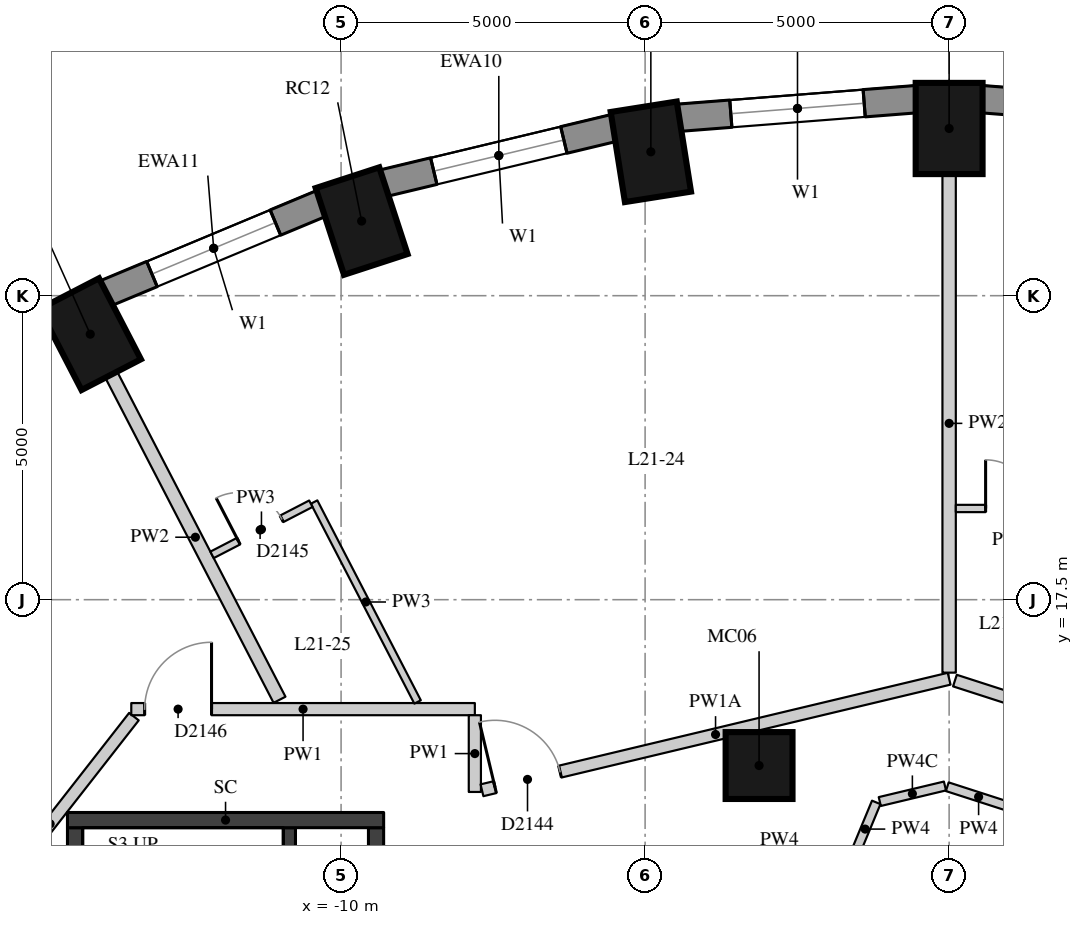
"""IFC4 building model, lengths in metres.
Left out: names, types, materials, properties, quantities, classifications, styles, units other than length and angle.
Written with IfcOpenShell. Run it as: python <this file> out.ifc"""

import sys

from ifc_helpers import new_model, si_unit, direction, frame, frame_2d, origin, origin_2d, place, context, subcontext, project, spatial, rectangle, extrude, element, fill, save


model = new_model("IFC4")
c1 = context("Model", 3, precision=1e-05, world=origin(), true_north=direction((0.0, 1.0)))
c2 = subcontext(c1, "Body", "Model", "MODEL_VIEW")
j1 = project(units=[si_unit("LENGTHUNIT", "METRE"), si_unit("PLANEANGLEUNIT", "RADIAN")], contexts=[c1])
p1 = place(None, origin())
s1 = spatial("IfcSite", under=j1, at=p1, CompositionType="ELEMENT")
p2 = place(p1, origin())
s2 = spatial("IfcBuilding", under=s1, at=p2, CompositionType="ELEMENT")
p3 = place(p2, frame((0.0, 0.0, 77.8)))
s3 = spatial("IfcBuildingStorey", under=s2, at=p3, CompositionType="ELEMENT", Elevation=77.8)
for number, where, z_axis, x_axis in (
    (1, (0.0, 25.25, 0.0), (0.0, 0.0, 1.0), (0.0, 1.0, 0.0)),
    (2, (-4.906, 24.866, 0.0), (0.0, 0.0, 1.0), (-0.156, 0.988, 0.0)),
    (3, (-9.662, 23.727, 0.0), (0.0, 0.0, 1.0), (-0.31, 0.951, 0.0)),
    (4, (-14.125, 21.867, 0.0), (0.0, 0.0, 1.0), (-0.46, 0.888, 0.0)),
):
    element("IfcColumn", number, at=place(p3, frame(where, z_axis=z_axis, x_axis=x_axis)), inside=s3, PredefinedType="COLUMN", context=c2, shape_type="SweptSolid", body=[
        extrude(rectangle(XDim=1.5, YDim=1.1, at=origin_2d()), origin(), (0.0, 0.0, 1.0), 3.3),
    ])
p4 = place(p3, frame((-3.126, 14.772, 0.0), z_axis=(0.0, 0.0, 1.0), x_axis=(1.0, 0.0, 0.0)))
e5 = element("IfcColumn", 5, at=p4, inside=s3, PredefinedType="COLUMN", context=c2, shape_type="SweptSolid", body=[
    extrude(rectangle(XDim=1.1, YDim=1.1, at=origin_2d()), origin(), (0.0, 0.0, 1.0), 3.3),
])
p5 = place(p3, frame((4.457, 25.426, 0.0), z_axis=(0.0, 0.0, 1.0), x_axis=(-0.996955972145, 0.077966592873, 0.0)))
e6 = element("IfcWall", 6, at=p5, inside=s3, PredefinedType="SOLIDWALL", context=c2, shape_type="SweptSolid", body=[
    extrude(rectangle(XDim=3.939, YDim=0.45, at=frame_2d((1.97, 0.0))), origin(), (0.0, 0.0, 1.0), 3.02),
])
p6 = place(p5, frame((0.87, 0.0, 0.4)))
e7 = element("IfcOpeningElement", 7, at=p6, cuts=e6, PredefinedType="OPENING", context=c2, shape_type="SweptSolid", body=[
    extrude(rectangle(XDim=2.2, YDim=1.75, at=frame_2d((1.1, 0.875))), frame((0.0, 0.235, 0.0), z_axis=(0.0, -1.0, 0.0), x_axis=(1.0, 0.0, 0.0)), (0.0, 0.0, 1.0), 0.47),
])
p7 = place(p3, frame((-0.53, 25.733, 0.0), z_axis=(0.0, 0.0, 1.0), x_axis=(-0.996955972145, -0.077966592873, 0.0)))
e8 = element("IfcWall", 8, at=p7, inside=s3, PredefinedType="SOLIDWALL", context=c2, shape_type="SweptSolid", body=[
    extrude(rectangle(XDim=3.939, YDim=0.45, at=frame_2d((1.97, 0.0))), origin(), (0.0, 0.0, 1.0), 3.02),
])
p8 = place(p7, frame((0.87, 0.0, 0.4)))
e9 = element("IfcOpeningElement", 9, at=p8, cuts=e8, PredefinedType="OPENING", context=c2, shape_type="SweptSolid", body=[
    extrude(rectangle(XDim=2.2, YDim=1.75, at=frame_2d((1.1, 0.875))), frame((0.0, 0.235, 0.0), z_axis=(0.0, -1.0, 0.0), x_axis=(1.0, 0.0, 0.0)), (0.0, 0.0, 1.0), 0.47),
])
p9 = place(p3, frame((-5.504, 25.26, 0.0), z_axis=(0.0, 0.0, 1.0), x_axis=(-0.972496561493, -0.232917233979, 0.0)))
e10 = element("IfcWall", 10, at=p9, inside=s3, PredefinedType="SOLIDWALL", context=c2, shape_type="SweptSolid", body=[
    extrude(rectangle(XDim=3.911, YDim=0.45, at=frame_2d((1.956, 0.0))), origin(), (0.0, 0.0, 1.0), 3.02),
])
p10 = place(p9, frame((0.855, 0.0, 0.4)))
e11 = element("IfcOpeningElement", 11, at=p10, cuts=e10, PredefinedType="OPENING", context=c2, shape_type="SweptSolid", body=[
    extrude(rectangle(XDim=2.2, YDim=1.75, at=frame_2d((1.1, 0.875))), frame((0.0, 0.235, 0.0), z_axis=(0.0, -1.0, 0.0), x_axis=(1.0, 0.0, 0.0)), (0.0, 0.0, 1.0), 0.47),
])
p11 = place(p3, frame((-10.315, 24.021, 0.0), z_axis=(0.0, 0.0, 1.0), x_axis=(-0.923031964282, -0.384723267966, 0.0)))
e12 = element("IfcWall", 12, at=p11, inside=s3, PredefinedType="SOLIDWALL", context=c2, shape_type="SweptSolid", body=[
    extrude(rectangle(XDim=3.856, YDim=0.45, at=frame_2d((1.928, 0.0))), origin(), (0.0, 0.0, 1.0), 3.02),
])
p12 = place(p11, frame((0.828, 0.0, 0.4)))
e13 = element("IfcOpeningElement", 13, at=p12, cuts=e12, PredefinedType="OPENING", context=c2, shape_type="SweptSolid", body=[
    extrude(rectangle(XDim=2.2, YDim=1.75, at=frame_2d((1.1, 0.875))), frame((0.0, 0.235, 0.0), z_axis=(0.0, -1.0, 0.0), x_axis=(1.0, 0.0, 0.0)), (0.0, 0.0, 1.0), 0.47),
])
p13 = place(p3, frame((-14.817, 22.051, 0.0), z_axis=(0.0, 0.0, 1.0), x_axis=(-0.847635480093, -0.530579016629, 0.0)))
e14 = element("IfcWall", 14, at=p13, inside=s3, PredefinedType="SOLIDWALL", context=c2, shape_type="SweptSolid", body=[
    extrude(rectangle(XDim=3.782, YDim=0.45, at=frame_2d((1.891, 0.0))), origin(), (0.0, 0.0, 1.0), 3.02),
])
p14 = place(p13, frame((0.791, 0.0, 0.4)))
e15 = element("IfcOpeningElement", 15, at=p14, cuts=e14, PredefinedType="OPENING", context=c2, shape_type="SweptSolid", body=[
    extrude(rectangle(XDim=2.2, YDim=1.75, at=frame_2d((1.1, 0.875))), frame((0.0, 0.235, 0.0), z_axis=(0.0, -1.0, 0.0), x_axis=(1.0, 0.0, 0.0)), (0.0, 0.0, 1.0), 0.47),
])
p15 = place(p3, frame((-10.85, 7.75, 0.0), z_axis=(0.0, 0.0, 1.0), x_axis=(0.0, 1.0, 0.0)))
e16 = element("IfcWall", 16, at=p15, inside=s3, PredefinedType="SHEAR", context=c2, shape_type="SweptSolid", body=[
    extrude(rectangle(XDim=6.0, YDim=0.2, at=frame_2d((3.0, 0.0))), origin(), (0.0, 0.0, 1.0), 3.02),
])
p16 = place(p15, frame((0.1, 0.0, 0.0)))
e17 = element("IfcOpeningElement", 17, at=p16, cuts=e16, PredefinedType="OPENING", context=c2, shape_type="SweptSolid", body=[
    extrude(rectangle(XDim=1.5, YDim=2.1, at=frame_2d((0.75, 1.05))), frame((0.0, 0.11, 0.0), z_axis=(0.0, -1.0, 0.0), x_axis=(1.0, 0.0, 0.0)), (0.0, 0.0, 1.0), 0.22),
])
p17 = place(p3, frame((-14.375, 7.75, -0.28), z_axis=(0.0, 0.0, 1.0), x_axis=(0.0, 1.0, 0.0)))
e18 = element("IfcWall", 18, at=p17, inside=s3, PredefinedType="SHEAR", context=c2, shape_type="SweptSolid", body=[
    extrude(rectangle(XDim=6.0, YDim=0.25, at=frame_2d((3.0, 0.0))), origin(), (0.0, 0.0, 1.0), 3.3),
])
p18 = place(p3, frame((-9.425, 7.75, -0.28), z_axis=(0.0, 0.0, 1.0), x_axis=(0.0, 1.0, 0.0)))
e19 = element("IfcWall", 19, at=p18, inside=s3, PredefinedType="SHEAR", context=c2, shape_type="SweptSolid", body=[
    extrude(rectangle(XDim=6.0, YDim=0.25, at=frame_2d((3.0, 0.0))), origin(), (0.0, 0.0, 1.0), 3.3),
])
p19 = place(p18, frame((2.1, 0.0, 0.28)))
e20 = element("IfcOpeningElement", 20, at=p19, cuts=e19, PredefinedType="OPENING", context=c2, shape_type="SweptSolid", body=[
    extrude(rectangle(XDim=1.5, YDim=2.1, at=frame_2d((0.75, 1.05))), frame((0.0, 0.135, 0.0), z_axis=(0.0, -1.0, 0.0), x_axis=(1.0, 0.0, 0.0)), (0.0, 0.0, 1.0), 0.27),
])
p20 = place(p3, frame((-14.5, 13.875, -0.28), z_axis=(0.0, 0.0, 1.0), x_axis=(1.0, 0.0, 0.0)))
e21 = element("IfcWall", 21, at=p20, inside=s3, PredefinedType="SHEAR", context=c2, shape_type="SweptSolid", body=[
    extrude(rectangle(XDim=5.2, YDim=0.25, at=frame_2d((2.6, 0.0))), origin(), (0.0, 0.0, 1.0), 3.3),
])
p21 = place(p3, frame((-16.163, 12.049, 0.0), z_axis=(0.0, 0.0, 1.0), x_axis=(0.6157435057, 0.787946657578, 0.0)))
e22 = element("IfcWall", 22, at=p21, inside=s3, PredefinedType="PARTITIONING", context=c2, shape_type="SweptSolid", body=[
    extrude(rectangle(XDim=4.477, YDim=0.2, at=frame_2d((2.239, 0.0))), origin(), (0.0, 0.0, 1.0), 3.02),
])
p22 = place(p3, frame((-13.45, 15.7, 0.0), z_axis=(0.0, 0.0, 1.0), x_axis=(1.0, 0.0, 0.0)))
e23 = element("IfcWall", 23, at=p22, inside=s3, PredefinedType="PARTITIONING", context=c2, shape_type="SweptSolid", body=[
    extrude(rectangle(XDim=5.65, YDim=0.2, at=frame_2d((2.825, 0.0))), origin(), (0.0, 0.0, 1.0), 3.02),
])
p23 = place(p22, frame((0.22, 0.0, 0.0)))
e24 = element("IfcOpeningElement", 24, at=p23, cuts=e23, PredefinedType="OPENING", context=c2, shape_type="SweptSolid", body=[
    extrude(rectangle(XDim=1.1, YDim=2.1, at=frame_2d((0.55, 1.05))), frame((0.0, 0.11, 0.0), z_axis=(0.0, -1.0, 0.0), x_axis=(1.0, 0.0, 0.0)), (0.0, 0.0, 1.0), 0.22),
])
p24 = place(p3, frame((-7.8, 15.6, 0.0), z_axis=(0.0, 0.0, 1.0), x_axis=(0.0, -1.0, 0.0)))
e25 = element("IfcWall", 25, at=p24, inside=s3, PredefinedType="PARTITIONING", context=c2, shape_type="SweptSolid", body=[
    extrude(rectangle(XDim=1.262, YDim=0.2, at=frame_2d((0.631, 0.0))), origin(), (0.0, 0.0, 1.0), 3.02),
])
p25 = place(p3, frame((-7.683, 14.365, 0.0), z_axis=(0.0, 0.0, 1.0), x_axis=(0.972657109353, 0.23224587752, 0.0)))
e26 = element("IfcWall", 26, at=p25, inside=s3, PredefinedType="PARTITIONING", context=c2, shape_type="SweptSolid", body=[
    extrude(rectangle(XDim=7.899, YDim=0.2, at=frame_2d((3.949, 0.0))), origin(), (0.0, 0.0, 1.0), 2.57),
])
p26 = place(p25, frame((0.22, 0.0, 0.0)))
e27 = element("IfcOpeningElement", 27, at=p26, cuts=e26, PredefinedType="OPENING", context=c2, shape_type="SweptSolid", body=[
    extrude(rectangle(XDim=1.1, YDim=2.1, at=frame_2d((0.55, 1.05))), frame((0.0, 0.11, 0.0), z_axis=(0.0, -1.0, 0.0), x_axis=(1.0, 0.0, 0.0)), (0.0, 0.0, 1.0), 0.22),
])
p27 = place(p3, frame((0.095, 16.169, 0.0), z_axis=(0.0, 0.0, 1.0), x_axis=(0.951667112614, -0.307131416122, 0.0)))
e28 = element("IfcWall", 28, at=p27, inside=s3, PredefinedType="PARTITIONING", context=c2, shape_type="SweptSolid", body=[
    extrude(rectangle(XDim=8.041, YDim=0.2, at=frame_2d((4.02, 0.0))), origin(), (0.0, 0.0, 1.0), 3.02),
])
p28 = place(p27, frame((4.309, 0.0, 0.0)))
e29 = element("IfcOpeningElement", 29, at=p28, cuts=e28, PredefinedType="OPENING", context=c2, shape_type="SweptSolid", body=[
    extrude(rectangle(XDim=1.1, YDim=2.1, at=frame_2d((0.55, 1.05))), frame((0.0, 0.11, 0.0), z_axis=(0.0, -1.0, 0.0), x_axis=(1.0, 0.0, 0.0)), (0.0, 0.0, 1.0), 0.22),
])
p29 = place(p3, frame((-1.563, 13.288, 0.0), z_axis=(0.0, 0.0, 1.0), x_axis=(0.382918810849, 0.923782000419, 0.0)))
e30 = element("IfcWall", 30, at=p29, inside=s3, PredefinedType="PARTITIONING", context=c2, shape_type="SweptSolid", body=[
    extrude(rectangle(XDim=0.951, YDim=0.15, at=frame_2d((0.475, 0.0))), origin(), (0.0, 0.0, 1.0), 3.02),
])
p30 = place(p3, frame((-1.14, 14.18, 0.0), z_axis=(0.0, 0.0, 1.0), x_axis=(0.972668158826, 0.232199596913, 0.0)))
e31 = element("IfcWall", 31, at=p30, inside=s3, PredefinedType="PARTITIONING", context=c2, shape_type="SweptSolid", body=[
    extrude(rectangle(XDim=1.102, YDim=0.15, at=frame_2d((0.551, 0.0))), origin(), (0.0, 0.0, 1.0), 2.42),
])
p31 = place(p3, frame((-0.031, 14.424, 0.0), z_axis=(0.0, 0.0, 1.0), x_axis=(0.951683114319, -0.307081829354, 0.0)))
e32 = element("IfcWall", 32, at=p31, inside=s3, PredefinedType="PARTITIONING", context=c2, shape_type="SweptSolid", body=[
    extrude(rectangle(XDim=1.083, YDim=0.15, at=frame_2d((0.542, 0.0))), origin(), (0.0, 0.0, 1.0), 3.02),
])
p32 = place(p3, frame((0.0, 24.5, 0.0), z_axis=(0.0, 0.0, 1.0), x_axis=(0.0, -1.0, 0.0)))
e33 = element("IfcWall", 33, at=p32, inside=s3, PredefinedType="PARTITIONING", context=c2, shape_type="SweptSolid", body=[
    extrude(rectangle(XDim=8.2, YDim=0.22, at=frame_2d((4.1, 0.0))), origin(), (0.0, 0.0, 1.0), 2.47),
])
p33 = place(p3, frame((-13.78, 21.201, 0.0), z_axis=(0.0, 0.0, 1.0), x_axis=(0.459689820266, -0.888079539875, 0.0)))
e34 = element("IfcWall", 34, at=p33, inside=s3, PredefinedType="PARTITIONING", context=c2, shape_type="SweptSolid", body=[
    extrude(rectangle(XDim=6.021, YDim=0.22, at=frame_2d((3.011, 0.0))), origin(), (0.0, 0.0, 1.0), 3.02),
])
p34 = place(p3, frame((-8.742, 15.818, 0.0), z_axis=(0.0, 0.0, 1.0), x_axis=(-0.45967225044, 0.888088634189, 0.0)))
e35 = element("IfcWall", 35, at=p34, inside=s3, PredefinedType="PARTITIONING", context=c2, shape_type="SweptSolid", body=[
    extrude(rectangle(XDim=3.702, YDim=0.12, at=frame_2d((1.851, 0.0))), origin(), (0.0, 0.0, 1.0), 3.02),
])
p35 = place(p3, frame((1.94, 19.0, 0.0), z_axis=(0.0, 0.0, 1.0), x_axis=(-1.0, 0.0, 0.0)))
e36 = element("IfcWall", 36, at=p35, inside=s3, PredefinedType="PARTITIONING", context=c2, shape_type="SweptSolid", body=[
    extrude(rectangle(XDim=1.83, YDim=0.12, at=frame_2d((0.915, 0.0))), origin(), (0.0, 0.0, 1.0), 3.02),
])
p36 = place(p35, frame((0.54, 0.0, 0.0)))
e37 = element("IfcOpeningElement", 37, at=p36, cuts=e36, PredefinedType="OPENING", context=c2, shape_type="SweptSolid", body=[
    extrude(rectangle(XDim=0.8, YDim=2.1, at=frame_2d((0.4, 1.05))), frame((0.0, 0.07, 0.0), z_axis=(0.0, -1.0, 0.0), x_axis=(1.0, 0.0, 0.0)), (0.0, 0.0, 1.0), 0.14),
])
p37 = place(p3, frame((-10.497, 19.078, 0.0), z_axis=(0.0, 0.0, 1.0), x_axis=(-0.888095574179, -0.459658842104, 0.0)))
e38 = element("IfcWall", 38, at=p37, inside=s3, PredefinedType="PARTITIONING", context=c2, shape_type="SweptSolid", body=[
    extrude(rectangle(XDim=1.83, YDim=0.12, at=frame_2d((0.915, 0.0))), origin(), (0.0, 0.0, 1.0), 3.02),
])
p38 = place(p37, frame((0.54, 0.0, 0.0)))
e39 = element("IfcOpeningElement", 39, at=p38, cuts=e38, PredefinedType="OPENING", context=c2, shape_type="SweptSolid", body=[
    extrude(rectangle(XDim=0.8, YDim=2.1, at=frame_2d((0.4, 1.05))), frame((0.0, 0.07, 0.0), z_axis=(0.0, -1.0, 0.0), x_axis=(1.0, 0.0, 0.0)), (0.0, 0.0, 1.0), 0.14),
])
p39 = place(p8, origin())
e40 = element("IfcWindow", 40, at=p39, inside=s3, PartitioningType="SINGLE_PANEL", PredefinedType="WINDOW", context=c2, shape_type="SweptSolid", body=[
    extrude(rectangle(XDim=2.2, YDim=1.75, at=frame_2d((1.1, 0.875))), frame((0.0, 0.035, 0.0), z_axis=(0.0, -1.0, 0.0), x_axis=(1.0, 0.0, 0.0)), (0.0, 0.0, 1.0), 0.06),
])
fill(e9, e40)
p40 = place(p10, origin())
e41 = element("IfcWindow", 41, at=p40, inside=s3, PartitioningType="SINGLE_PANEL", PredefinedType="WINDOW", context=c2, shape_type="SweptSolid", body=[
    extrude(rectangle(XDim=2.2, YDim=1.75, at=frame_2d((1.1, 0.875))), frame((0.0, 0.035, 0.0), z_axis=(0.0, -1.0, 0.0), x_axis=(1.0, 0.0, 0.0)), (0.0, 0.0, 1.0), 0.06),
])
fill(e11, e41)
p41 = place(p12, origin())
e42 = element("IfcWindow", 42, at=p41, inside=s3, PartitioningType="SINGLE_PANEL", PredefinedType="WINDOW", context=c2, shape_type="SweptSolid", body=[
    extrude(rectangle(XDim=2.2, YDim=1.75, at=frame_2d((1.1, 0.875))), frame((0.0, 0.035, 0.0), z_axis=(0.0, -1.0, 0.0), x_axis=(1.0, 0.0, 0.0)), (0.0, 0.0, 1.0), 0.06),
])
fill(e13, e42)
p42 = place(p36, origin())
e43 = element("IfcDoor", 43, at=p42, inside=s3, OperationType="SINGLE_SWING_LEFT", PredefinedType="DOOR", context=c2, shape_type="SweptSolid", body=[
    extrude(rectangle(XDim=0.8, YDim=2.1, at=frame_2d((0.4, 1.05))), frame((0.0, 0.025, 0.0), z_axis=(0.0, -1.0, 0.0), x_axis=(1.0, 0.0, 0.0)), (0.0, 0.0, 1.0), 0.05),
])
fill(e37, e43)
p43 = place(p26, origin())
e44 = element("IfcDoor", 44, at=p43, inside=s3, OperationType="SINGLE_SWING_LEFT", PredefinedType="DOOR", context=c2, shape_type="SweptSolid", body=[
    extrude(rectangle(XDim=1.1, YDim=2.1, at=frame_2d((0.55, 1.05))), frame((0.0, 0.025, 0.0), z_axis=(0.0, -1.0, 0.0), x_axis=(1.0, 0.0, 0.0)), (0.0, 0.0, 1.0), 0.05),
])
fill(e27, e44)
p44 = place(p38, origin())
e45 = element("IfcDoor", 45, at=p44, inside=s3, OperationType="SINGLE_SWING_LEFT", PredefinedType="DOOR", context=c2, shape_type="SweptSolid", body=[
    extrude(rectangle(XDim=0.8, YDim=2.1, at=frame_2d((0.4, 1.05))), frame((0.0, 0.025, 0.0), z_axis=(0.0, -1.0, 0.0), x_axis=(1.0, 0.0, 0.0)), (0.0, 0.0, 1.0), 0.05),
])
fill(e39, e45)
p45 = place(p23, origin())
e46 = element("IfcDoor", 46, at=p45, inside=s3, OperationType="SINGLE_SWING_RIGHT", PredefinedType="DOOR", context=c2, shape_type="SweptSolid", body=[
    extrude(rectangle(XDim=1.1, YDim=2.1, at=frame_2d((0.55, 1.05))), frame((0.0, 0.025, 0.0), z_axis=(0.0, -1.0, 0.0), x_axis=(1.0, 0.0, 0.0)), (0.0, 0.0, 1.0), 0.05),
])
fill(e24, e46)
save(model, sys.argv[1])
